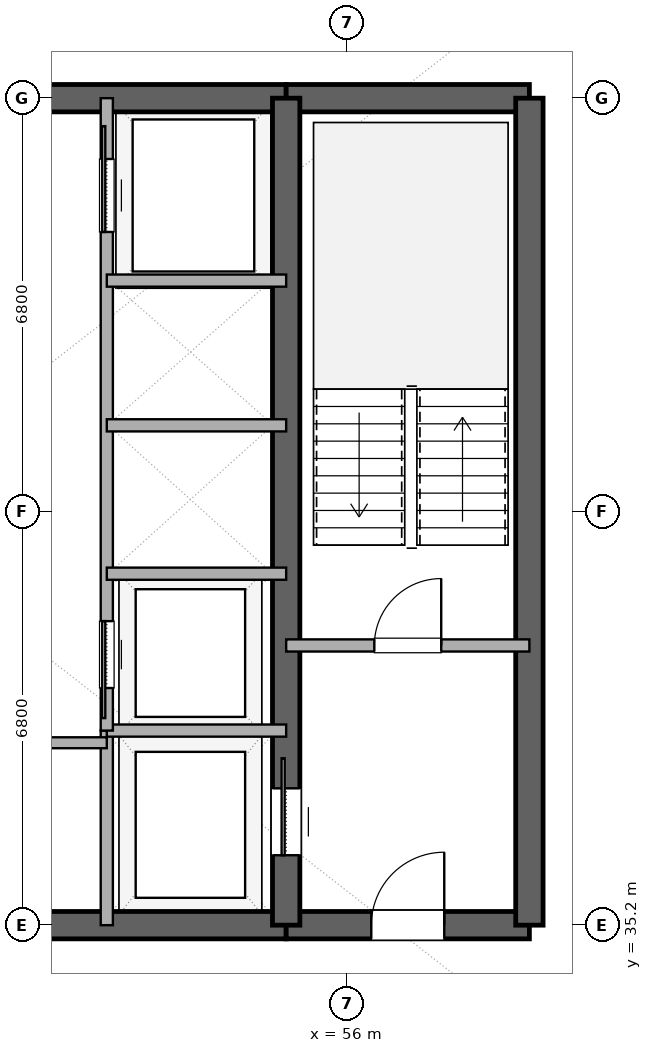
"""IFC4 building model, lengths in metres.
Left out: names, types, materials, properties, quantities, classifications, styles, units other than length and angle.
Written with IfcOpenShell. Run it as: python <this file> out.ifc"""

import sys

from ifc_helpers import new_model, si_unit, direction, frame, frame_2d, origin, place, context, subcontext, project, spatial, rectangle, extrude, element, fill, save


model = new_model("IFC4")
c1 = context("Model", 3, precision=1e-05, world=origin(), true_north=direction((0.0, 1.0)))
c2 = subcontext(c1, "Body", "Model", "MODEL_VIEW")
j1 = project(units=[si_unit("LENGTHUNIT", "METRE"), si_unit("PLANEANGLEUNIT", "RADIAN")], contexts=[c1])
p1 = place(None, origin())
s1 = spatial("IfcSite", under=j1, at=p1, CompositionType="ELEMENT")
p2 = place(p1, origin())
s2 = spatial("IfcBuilding", under=s1, at=p2, CompositionType="ELEMENT")
p3 = place(p2, frame((0.0, 0.0, 175.8)))
s3 = spatial("IfcBuildingStorey", under=s2, at=p3, CompositionType="ELEMENT", Elevation=175.8)
p4 = place(p3, frame((41.0, 35.2, 0.0), z_axis=(0.0, 0.0, 1.0), x_axis=(1.0, 0.0, 0.0)))
e1 = element("IfcWall", 1, at=p4, inside=s3, PredefinedType="SHEAR", context=c2, shape_type="SweptSolid", body=[
    extrude(rectangle(XDim=14.0, YDim=0.45, at=frame_2d((7.0, 0.0))), origin(), (0.0, 0.0, 1.0), 3.38),
])
p5 = place(p4, frame((6.1, 0.0, 0.0)))
e2 = element("IfcOpeningElement", 2, at=p5, cuts=e1, PredefinedType="OPENING", context=c2, shape_type="SweptSolid", body=[
    extrude(rectangle(XDim=1.8, YDim=2.25, at=frame_2d((0.9, 1.125))), frame((0.0, 0.235, 0.0), z_axis=(0.0, -1.0, 0.0), x_axis=(1.0, 0.0, 0.0)), (0.0, 0.0, 1.0), 0.47),
])
p6 = place(p3, frame((55.0, 35.2, 0.0), z_axis=(0.0, 0.0, 1.0), x_axis=(1.0, 0.0, 0.0)))
e3 = element("IfcWall", 3, at=p6, inside=s3, PredefinedType="SHEAR", context=c2, shape_type="SweptSolid", body=[
    extrude(rectangle(XDim=4.0, YDim=0.45, at=frame_2d((2.0, 0.0))), origin(), (0.0, 0.0, 1.0), 3.38),
])
p7 = place(p6, frame((1.4, 0.0, 0.0)))
e4 = element("IfcOpeningElement", 4, at=p7, cuts=e3, PredefinedType="OPENING", context=c2, shape_type="SweptSolid", body=[
    extrude(rectangle(XDim=1.2, YDim=2.15, at=frame_2d((0.6, 1.075))), frame((0.0, 0.235, 0.0), z_axis=(0.0, -1.0, 0.0), x_axis=(1.0, 0.0, 0.0)), (0.0, 0.0, 1.0), 0.47),
])
p8 = place(p3, frame((41.0, 48.8, 0.0), z_axis=(0.0, 0.0, 1.0), x_axis=(1.0, 0.0, 0.0)))
e5 = element("IfcWall", 5, at=p8, inside=s3, PredefinedType="SHEAR", context=c2, shape_type="SweptSolid", body=[
    extrude(rectangle(XDim=14.0, YDim=0.45, at=frame_2d((7.0, 0.0))), origin(), (0.0, 0.0, 1.0), 3.38),
])
p9 = place(p8, frame((6.1, 0.0, 0.0)))
e6 = element("IfcOpeningElement", 6, at=p9, cuts=e5, PredefinedType="OPENING", context=c2, shape_type="SweptSolid", body=[
    extrude(rectangle(XDim=1.8, YDim=2.25, at=frame_2d((0.9, 1.125))), frame((0.0, 0.235, 0.0), z_axis=(0.0, -1.0, 0.0), x_axis=(1.0, 0.0, 0.0)), (0.0, 0.0, 1.0), 0.47),
])
p10 = place(p3, frame((55.0, 48.8, 0.0), z_axis=(0.0, 0.0, 1.0), x_axis=(1.0, 0.0, 0.0)))
e7 = element("IfcWall", 7, at=p10, inside=s3, PredefinedType="SHEAR", context=c2, shape_type="SweptSolid", body=[
    extrude(rectangle(XDim=4.0, YDim=0.45, at=frame_2d((2.0, 0.0))), origin(), (0.0, 0.0, 1.0), 3.38),
])
p11 = place(p3, frame((59.0, 35.2, 0.0), z_axis=(0.0, 0.0, 1.0), x_axis=(0.0, 1.0, 0.0)))
e8 = element("IfcWall", 8, at=p11, inside=s3, PredefinedType="SHEAR", context=c2, shape_type="SweptSolid", body=[
    extrude(rectangle(XDim=13.6, YDim=0.45, at=frame_2d((6.8, 0.0))), origin(), (0.0, 0.0, 1.0), 3.38),
])
p12 = place(p3, frame((55.0, 35.2, 0.0), z_axis=(0.0, 0.0, 1.0), x_axis=(0.0, 1.0, 0.0)))
e9 = element("IfcWall", 9, at=p12, inside=s3, PredefinedType="SHEAR", context=c2, shape_type="SweptSolid", body=[
    extrude(rectangle(XDim=13.6, YDim=0.45, at=frame_2d((6.8, 0.0))), origin(), (0.0, 0.0, 1.0), 3.38),
])
p13 = place(p12, frame((1.15, 0.0, 0.0)))
e10 = element("IfcOpeningElement", 10, at=p13, cuts=e9, PredefinedType="OPENING", context=c2, shape_type="SweptSolid", body=[
    extrude(rectangle(XDim=1.1, YDim=2.2, at=frame_2d((0.55, 1.1))), frame((0.0, 0.235, 0.0), z_axis=(0.0, -1.0, 0.0), x_axis=(1.0, 0.0, 0.0)), (0.0, 0.0, 1.0), 0.47),
])
p14 = place(p3, frame((55.0, 39.8, 0.0), z_axis=(0.0, 0.0, 1.0), x_axis=(1.0, 0.0, 0.0)))
e11 = element("IfcWall", 11, at=p14, inside=s3, PredefinedType="SOLIDWALL", context=c2, shape_type="SweptSolid", body=[
    extrude(rectangle(XDim=4.0, YDim=0.2, at=frame_2d((2.0, 0.0))), origin(), (0.0, 0.0, 1.0), 2.74),
])
p15 = place(p14, frame((1.45, 0.0, 0.0)))
e12 = element("IfcOpeningElement", 12, at=p15, cuts=e11, PredefinedType="OPENING", context=c2, shape_type="SweptSolid", body=[
    extrude(rectangle(XDim=1.1, YDim=2.15, at=frame_2d((0.55, 1.075))), frame((0.0, 0.11, 0.0), z_axis=(0.0, -1.0, 0.0), x_axis=(1.0, 0.0, 0.0)), (0.0, 0.0, 1.0), 0.22),
])
p16 = place(p3, frame((52.05, 35.2, 0.0), z_axis=(0.0, 0.0, 1.0), x_axis=(0.0, 1.0, 0.0)))
e13 = element("IfcWall", 13, at=p16, inside=s3, PredefinedType="SOLIDWALL", context=c2, shape_type="SweptSolid", body=[
    extrude(rectangle(XDim=3.2, YDim=0.2, at=frame_2d((1.6, 0.0))), origin(), (0.0, 0.0, 1.0), 2.74),
])
p17 = place(p3, frame((52.05, 38.4, 0.0), z_axis=(0.0, 0.0, 1.0), x_axis=(1.0, 0.0, 0.0)))
e14 = element("IfcWall", 14, at=p17, inside=s3, PredefinedType="SOLIDWALL", context=c2, shape_type="SweptSolid", body=[
    extrude(rectangle(XDim=2.95, YDim=0.2, at=frame_2d((1.475, 0.0))), origin(), (0.0, 0.0, 1.0), 2.74),
])
p18 = place(p3, frame((52.05, 38.4, 0.0), z_axis=(0.0, 0.0, 1.0), x_axis=(0.0, 1.0, 0.0)))
e15 = element("IfcWall", 15, at=p18, inside=s3, PredefinedType="SOLIDWALL", context=c2, shape_type="SweptSolid", body=[
    extrude(rectangle(XDim=10.4, YDim=0.2, at=frame_2d((5.2, 0.0))), origin(), (0.0, 0.0, 1.0), 2.74),
])
p19 = place(p18, frame((0.7, 0.0, 0.0)))
e16 = element("IfcOpeningElement", 16, at=p19, cuts=e15, PredefinedType="OPENING", context=c2, shape_type="SweptSolid", body=[
    extrude(rectangle(XDim=1.1, YDim=2.2, at=frame_2d((0.55, 1.1))), frame((0.0, 0.11, 0.0), z_axis=(0.0, -1.0, 0.0), x_axis=(1.0, 0.0, 0.0)), (0.0, 0.0, 1.0), 0.22),
])
p20 = place(p18, frame((8.2, 0.0, 0.0)))
e17 = element("IfcOpeningElement", 17, at=p20, cuts=e15, PredefinedType="OPENING", context=c2, shape_type="SweptSolid", body=[
    extrude(rectangle(XDim=1.2, YDim=2.2, at=frame_2d((0.6, 1.1))), frame((0.0, 0.11, 0.0), z_axis=(0.0, -1.0, 0.0), x_axis=(1.0, 0.0, 0.0)), (0.0, 0.0, 1.0), 0.22),
])
for number, where, z_axis, x_axis in (
    (18, (52.05, 40.98, 0.0), (0.0, 0.0, 1.0), (1.0, 0.0, 0.0)),
    (19, (52.05, 43.42, 0.0), (0.0, 0.0, 1.0), (1.0, 0.0, 0.0)),
    (20, (52.05, 45.8, 0.0), (0.0, 0.0, 1.0), (1.0, 0.0, 0.0)),
):
    element("IfcWall", number, at=place(p3, frame(where, z_axis=z_axis, x_axis=x_axis)), inside=s3, PredefinedType="SOLIDWALL", context=c2, shape_type="SweptSolid", body=[
        extrude(rectangle(XDim=2.95, YDim=0.2, at=frame_2d((1.475, 0.0))), origin(), (0.0, 0.0, 1.0), 2.74),
    ])
p21 = place(p3, frame((49.9, 38.2, 0.0), z_axis=(0.0, 0.0, 1.0), x_axis=(1.0, 0.0, 0.0)))
e21 = element("IfcWall", 21, at=p21, inside=s3, PredefinedType="PLUMBINGWALL", context=c2, shape_type="SweptSolid", body=[
    extrude(rectangle(XDim=2.15, YDim=0.18, at=frame_2d((1.075, 0.0))), origin(), (0.0, 0.0, 1.0), 2.74),
])
p22 = place(p13, origin())
e22 = element("IfcDoor", 22, at=p22, inside=s3, OperationType="SLIDING_TO_RIGHT", PredefinedType="DOOR", context=c2, shape_type="SweptSolid", body=[
    extrude(rectangle(XDim=1.1, YDim=2.2, at=frame_2d((0.55, 1.1))), frame((0.0, 0.025, 0.0), z_axis=(0.0, -1.0, 0.0), x_axis=(1.0, 0.0, 0.0)), (0.0, 0.0, 1.0), 0.05),
])
fill(e10, e22)
p23 = place(p7, origin())
e23 = element("IfcDoor", 23, at=p23, inside=s3, OperationType="SINGLE_SWING_RIGHT", PredefinedType="DOOR", context=c2, shape_type="SweptSolid", body=[
    extrude(rectangle(XDim=1.2, YDim=2.15, at=frame_2d((0.6, 1.075))), frame((0.0, 0.025, 0.0), z_axis=(0.0, -1.0, 0.0), x_axis=(1.0, 0.0, 0.0)), (0.0, 0.0, 1.0), 0.05),
])
fill(e4, e23)
p24 = place(p15, origin())
e24 = element("IfcDoor", 24, at=p24, inside=s3, OperationType="SINGLE_SWING_RIGHT", PredefinedType="DOOR", context=c2, shape_type="SweptSolid", body=[
    extrude(rectangle(XDim=1.1, YDim=2.15, at=frame_2d((0.55, 1.075))), frame((0.0, 0.025, 0.0), z_axis=(0.0, -1.0, 0.0), x_axis=(1.0, 0.0, 0.0)), (0.0, 0.0, 1.0), 0.05),
])
fill(e12, e24)
p25 = place(p19, origin())
e25 = element("IfcDoor", 25, at=p25, inside=s3, OperationType="SLIDING_TO_LEFT", PredefinedType="DOOR", context=c2, shape_type="SweptSolid", body=[
    extrude(rectangle(XDim=1.1, YDim=2.2, at=frame_2d((0.55, 1.1))), frame((0.0, 0.025, 0.0), z_axis=(0.0, -1.0, 0.0), x_axis=(1.0, 0.0, 0.0)), (0.0, 0.0, 1.0), 0.05),
])
fill(e16, e25)
p26 = place(p20, origin())
e26 = element("IfcDoor", 26, at=p26, inside=s3, OperationType="SLIDING_TO_RIGHT", PredefinedType="DOOR", context=c2, shape_type="SweptSolid", body=[
    extrude(rectangle(XDim=1.2, YDim=2.2, at=frame_2d((0.6, 1.1))), frame((0.0, 0.025, 0.0), z_axis=(0.0, -1.0, 0.0), x_axis=(1.0, 0.0, 0.0)), (0.0, 0.0, 1.0), 0.05),
])
fill(e17, e26)
save(model, sys.argv[1])
